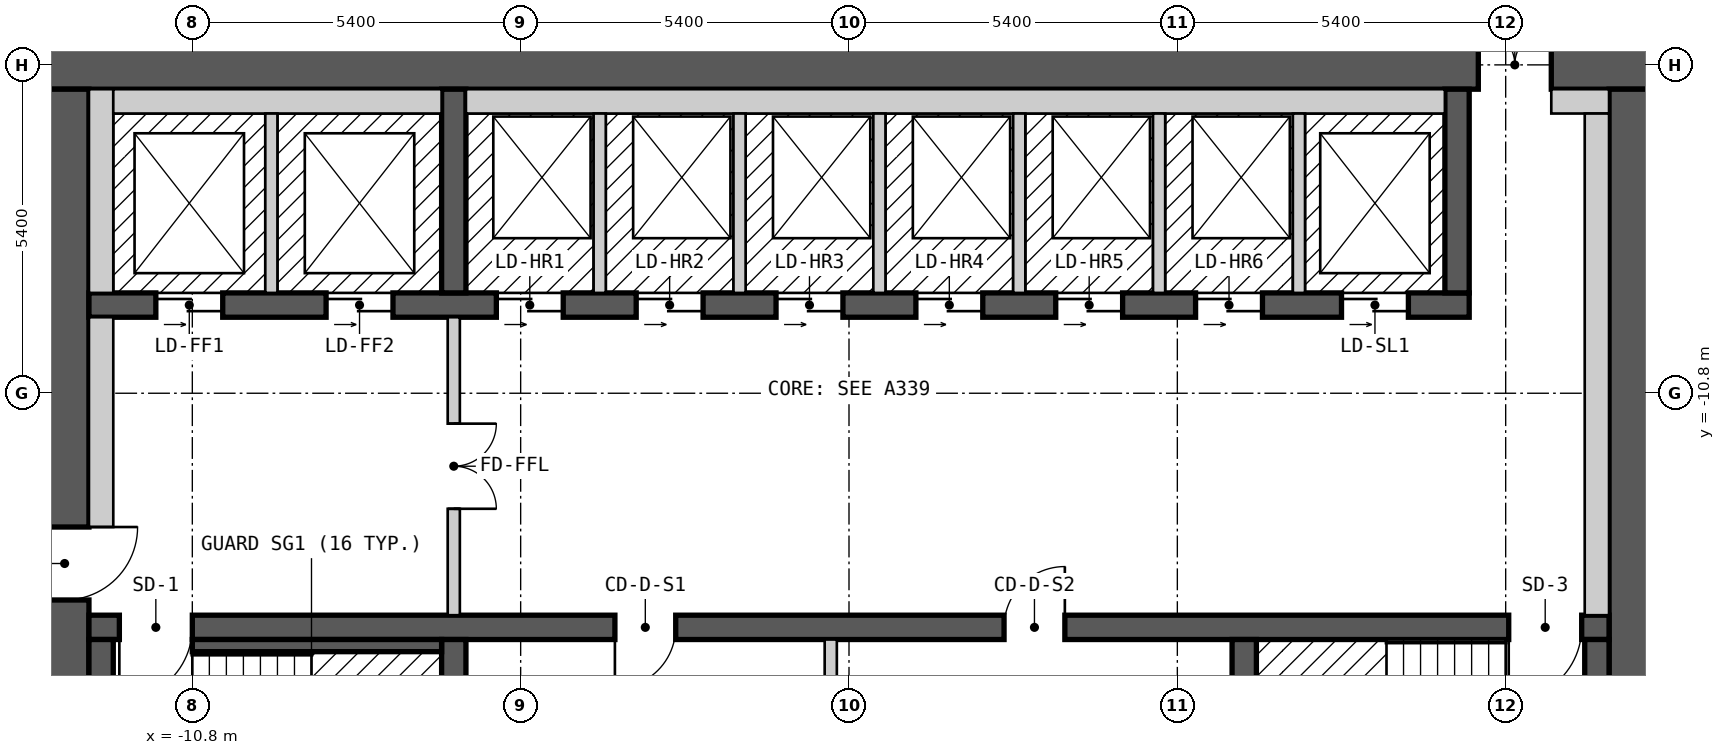
"""IFC4 building model, lengths in metres.
Left out: names, types, materials, properties, quantities, classifications, styles, units other than length and angle.
Written with IfcOpenShell. Run it as: python <this file> out.ifc"""

import sys

from ifc_helpers import new_model, si_unit, direction, frame, frame_2d, origin, place, context, subcontext, project, spatial, rectangle, extrude, element, fill, save


model = new_model("IFC4")
c1 = context("Model", 3, precision=1e-05, world=origin(), true_north=direction((0.0, 1.0)))
c2 = subcontext(c1, "Body", "Model", "MODEL_VIEW")
j1 = project(units=[si_unit("LENGTHUNIT", "METRE"), si_unit("PLANEANGLEUNIT", "RADIAN")], contexts=[c1])
p1 = place(None, origin())
s1 = spatial("IfcSite", under=j1, at=p1, CompositionType="ELEMENT")
p2 = place(p1, origin())
s2 = spatial("IfcBuilding", under=s1, at=p2, CompositionType="ELEMENT")
p3 = place(p2, frame((0.0, 0.0, 144.6)))
s3 = spatial("IfcBuildingStorey", under=s2, at=p3, CompositionType="ELEMENT", Elevation=144.6)
p4 = place(p3, frame((-13.3, -5.4, 0.0), z_axis=(0.0, 0.0, 1.0), x_axis=(1.0, 0.0, 0.0)))
e1 = element("IfcWall", 1, at=p4, inside=s3, PredefinedType="SHEAR", context=c2, shape_type="SweptSolid", body=[
    extrude(rectangle(XDim=26.6, YDim=0.8, at=frame_2d((13.3, 0.0))), origin(), (0.0, 0.0, 1.0), 2.7),
])
p5 = place(p4, frame((23.65, 0.0, 0.0)))
e2 = element("IfcOpeningElement", 2, at=p5, cuts=e1, PredefinedType="OPENING", context=c2, shape_type="SweptSolid", body=[
    extrude(rectangle(XDim=1.2, YDim=2.1, at=frame_2d((0.6, 1.05))), frame((0.0, 0.41, 0.0), z_axis=(0.0, -1.0, 0.0), x_axis=(1.0, 0.0, 0.0)), (0.0, 0.0, 1.0), 0.82),
])
p6 = place(p3, frame((-12.9, -18.2, 0.0), z_axis=(0.0, 0.0, 1.0), x_axis=(0.0, 1.0, 0.0)))
e3 = element("IfcWall", 3, at=p6, inside=s3, PredefinedType="SHEAR", context=c2, shape_type="SweptSolid", body=[
    extrude(rectangle(XDim=12.4, YDim=0.8, at=frame_2d((6.2, 0.0))), origin(), (0.0, 0.0, 1.0), 2.7),
])
p7 = place(p6, frame((4.0, 0.0, 0.0)))
e4 = element("IfcOpeningElement", 4, at=p7, cuts=e3, PredefinedType="OPENING", context=c2, shape_type="SweptSolid", body=[
    extrude(rectangle(XDim=1.2, YDim=2.1, at=frame_2d((0.6, 1.05))), frame((0.0, 0.41, 0.0), z_axis=(0.0, -1.0, 0.0), x_axis=(1.0, 0.0, 0.0)), (0.0, 0.0, 1.0), 0.82),
])
p8 = place(p3, frame((12.9, -18.2, 0.0), z_axis=(0.0, 0.0, 1.0), x_axis=(0.0, 1.0, 0.0)))
e5 = element("IfcWall", 5, at=p8, inside=s3, PredefinedType="SHEAR", context=c2, shape_type="SweptSolid", body=[
    extrude(rectangle(XDim=12.4, YDim=0.8, at=frame_2d((6.2, 0.0))), origin(), (0.0, 0.0, 1.0), 2.7),
])
p9 = place(p3, frame((-12.5, -14.65, 0.0), z_axis=(0.0, 0.0, 1.0), x_axis=(1.0, 0.0, 0.0)))
e6 = element("IfcWall", 6, at=p9, inside=s3, PredefinedType="SHEAR", context=c2, shape_type="SweptSolid", body=[
    extrude(rectangle(XDim=25.0, YDim=0.4, at=frame_2d((12.5, 0.0))), origin(), (0.0, 0.0, 1.0), 2.7),
])
p10 = place(p9, frame((1.7, 0.0, 0.0), z_axis=(0.0, 0.0, 1.0), x_axis=(-1.0, 0.0, 0.0)))
e7 = element("IfcOpeningElement", 7, at=p10, cuts=e6, PredefinedType="OPENING", context=c2, shape_type="SweptSolid", body=[
    extrude(rectangle(XDim=1.2, YDim=2.1, at=frame_2d((0.6, 1.05))), frame((0.0, 0.21, 0.0), z_axis=(0.0, -1.0, 0.0), x_axis=(1.0, 0.0, 0.0)), (0.0, 0.0, 1.0), 0.42),
])
p11 = place(p9, frame((24.55, 0.0, 0.0), z_axis=(0.0, 0.0, 1.0), x_axis=(-1.0, 0.0, 0.0)))
e8 = element("IfcOpeningElement", 8, at=p11, cuts=e6, PredefinedType="OPENING", context=c2, shape_type="SweptSolid", body=[
    extrude(rectangle(XDim=1.2, YDim=2.1, at=frame_2d((0.6, 1.05))), frame((0.0, 0.21, 0.0), z_axis=(0.0, -1.0, 0.0), x_axis=(1.0, 0.0, 0.0)), (0.0, 0.0, 1.0), 0.42),
])
p12 = place(p9, frame((9.65, 0.0, 0.0), z_axis=(0.0, 0.0, 1.0), x_axis=(-1.0, 0.0, 0.0)))
e9 = element("IfcOpeningElement", 9, at=p12, cuts=e6, PredefinedType="OPENING", context=c2, shape_type="SweptSolid", body=[
    extrude(rectangle(XDim=1.0, YDim=2.1, at=frame_2d((0.5, 1.05))), frame((0.0, 0.21, 0.0), z_axis=(0.0, -1.0, 0.0), x_axis=(1.0, 0.0, 0.0)), (0.0, 0.0, 1.0), 0.42),
])
p13 = place(p9, frame((16.05, 0.0, 0.0), z_axis=(0.0, 0.0, 1.0), x_axis=(-1.0, 0.0, 0.0)))
e10 = element("IfcOpeningElement", 10, at=p13, cuts=e6, PredefinedType="OPENING", context=c2, shape_type="SweptSolid", body=[
    extrude(rectangle(XDim=1.0, YDim=2.1, at=frame_2d((0.5, 1.05))), frame((0.0, 0.21, 0.0), z_axis=(0.0, -1.0, 0.0), x_axis=(1.0, 0.0, 0.0)), (0.0, 0.0, 1.0), 0.42),
])
p14 = place(p3, frame((-12.5, -9.35, 0.0), z_axis=(0.0, 0.0, 1.0), x_axis=(1.0, 0.0, 0.0)))
e11 = element("IfcWall", 11, at=p14, inside=s3, PredefinedType="SHEAR", context=c2, shape_type="SweptSolid", body=[
    extrude(rectangle(XDim=22.7, YDim=0.4, at=frame_2d((11.35, 0.0))), origin(), (0.0, 0.0, 1.0), 2.7),
])
p15 = place(p14, frame((1.1, 0.0, 0.0)))
e12 = element("IfcOpeningElement", 12, at=p15, cuts=e11, PredefinedType="OPENING", context=c2, shape_type="SweptSolid", body=[
    extrude(rectangle(XDim=1.1, YDim=2.1, at=frame_2d((0.55, 1.05))), frame((0.0, 0.21, 0.0), z_axis=(0.0, -1.0, 0.0), x_axis=(1.0, 0.0, 0.0)), (0.0, 0.0, 1.0), 0.42),
])
p16 = place(p14, frame((3.9, 0.0, 0.0)))
e13 = element("IfcOpeningElement", 13, at=p16, cuts=e11, PredefinedType="OPENING", context=c2, shape_type="SweptSolid", body=[
    extrude(rectangle(XDim=1.1, YDim=2.1, at=frame_2d((0.55, 1.05))), frame((0.0, 0.21, 0.0), z_axis=(0.0, -1.0, 0.0), x_axis=(1.0, 0.0, 0.0)), (0.0, 0.0, 1.0), 0.42),
])
p17 = place(p14, frame((6.7, 0.0, 0.0)))
e14 = element("IfcOpeningElement", 14, at=p17, cuts=e11, PredefinedType="OPENING", context=c2, shape_type="SweptSolid", body=[
    extrude(rectangle(XDim=1.1, YDim=2.1, at=frame_2d((0.55, 1.05))), frame((0.0, 0.21, 0.0), z_axis=(0.0, -1.0, 0.0), x_axis=(1.0, 0.0, 0.0)), (0.0, 0.0, 1.0), 0.42),
])
p18 = place(p14, frame((9.0, 0.0, 0.0)))
e15 = element("IfcOpeningElement", 15, at=p18, cuts=e11, PredefinedType="OPENING", context=c2, shape_type="SweptSolid", body=[
    extrude(rectangle(XDim=1.1, YDim=2.1, at=frame_2d((0.55, 1.05))), frame((0.0, 0.21, 0.0), z_axis=(0.0, -1.0, 0.0), x_axis=(1.0, 0.0, 0.0)), (0.0, 0.0, 1.0), 0.42),
])
p19 = place(p14, frame((11.3, 0.0, 0.0)))
e16 = element("IfcOpeningElement", 16, at=p19, cuts=e11, PredefinedType="OPENING", context=c2, shape_type="SweptSolid", body=[
    extrude(rectangle(XDim=1.1, YDim=2.1, at=frame_2d((0.55, 1.05))), frame((0.0, 0.21, 0.0), z_axis=(0.0, -1.0, 0.0), x_axis=(1.0, 0.0, 0.0)), (0.0, 0.0, 1.0), 0.42),
])
p20 = place(p14, frame((13.6, 0.0, 0.0)))
e17 = element("IfcOpeningElement", 17, at=p20, cuts=e11, PredefinedType="OPENING", context=c2, shape_type="SweptSolid", body=[
    extrude(rectangle(XDim=1.1, YDim=2.1, at=frame_2d((0.55, 1.05))), frame((0.0, 0.21, 0.0), z_axis=(0.0, -1.0, 0.0), x_axis=(1.0, 0.0, 0.0)), (0.0, 0.0, 1.0), 0.42),
])
p21 = place(p14, frame((15.9, 0.0, 0.0)))
e18 = element("IfcOpeningElement", 18, at=p21, cuts=e11, PredefinedType="OPENING", context=c2, shape_type="SweptSolid", body=[
    extrude(rectangle(XDim=1.1, YDim=2.1, at=frame_2d((0.55, 1.05))), frame((0.0, 0.21, 0.0), z_axis=(0.0, -1.0, 0.0), x_axis=(1.0, 0.0, 0.0)), (0.0, 0.0, 1.0), 0.42),
])
p22 = place(p14, frame((18.2, 0.0, 0.0)))
e19 = element("IfcOpeningElement", 19, at=p22, cuts=e11, PredefinedType="OPENING", context=c2, shape_type="SweptSolid", body=[
    extrude(rectangle(XDim=1.1, YDim=2.1, at=frame_2d((0.55, 1.05))), frame((0.0, 0.21, 0.0), z_axis=(0.0, -1.0, 0.0), x_axis=(1.0, 0.0, 0.0)), (0.0, 0.0, 1.0), 0.42),
])
p23 = place(p14, frame((20.6, 0.0, 0.0)))
e20 = element("IfcOpeningElement", 20, at=p23, cuts=e11, PredefinedType="OPENING", context=c2, shape_type="SweptSolid", body=[
    extrude(rectangle(XDim=1.1, YDim=2.1, at=frame_2d((0.55, 1.05))), frame((0.0, 0.21, 0.0), z_axis=(0.0, -1.0, 0.0), x_axis=(1.0, 0.0, 0.0)), (0.0, 0.0, 1.0), 0.42),
])
for number, where, z_axis, x_axis in (
    (21, (-6.5, -18.2, 0.0), (0.0, 0.0, 1.0), (0.0, 1.0, 0.0)),
    (22, (6.5, -18.2, 0.0), (0.0, 0.0, 1.0), (0.0, 1.0, 0.0)),
    (23, (-6.5, -9.15, 0.0), (0.0, 0.0, 1.0), (0.0, 1.0, 0.0)),
    (24, (10.0, -9.15, 0.0), (0.0, 0.0, 1.0), (0.0, 1.0, 0.0)),
):
    element("IfcWall", number, at=place(p3, frame(where, z_axis=z_axis, x_axis=x_axis)), inside=s3, PredefinedType="SHEAR", context=c2, shape_type="SweptSolid", body=[
        extrude(rectangle(XDim=3.35, YDim=0.4, at=frame_2d((1.675, 0.0))), origin(), (0.0, 0.0, 1.0), 2.7),
    ])
p24 = place(p3, frame((-12.3, -18.2, 0.0), z_axis=(0.0, 0.0, 1.0), x_axis=(0.0, 1.0, 0.0)))
e25 = element("IfcWall", 25, at=p24, inside=s3, PredefinedType="SOLIDWALL", context=c2, shape_type="SweptSolid", body=[
    extrude(rectangle(XDim=3.35, YDim=0.4, at=frame_2d((1.675, 0.0))), origin(), (0.0, 0.0, 1.0), 2.7),
])
p25 = place(p3, frame((-12.3, -13.0, 0.0), z_axis=(0.0, 0.0, 1.0), x_axis=(0.0, 1.0, 0.0)))
e26 = element("IfcWall", 26, at=p25, inside=s3, PredefinedType="PARTITIONING", context=c2, shape_type="SweptSolid", body=[
    extrude(rectangle(XDim=3.45, YDim=0.4, at=frame_2d((1.725, 0.0))), origin(), (0.0, 0.0, 1.0), 2.7),
])
p26 = place(p3, frame((-12.3, -9.15, 0.0), z_axis=(0.0, 0.0, 1.0), x_axis=(0.0, 1.0, 0.0)))
e27 = element("IfcWall", 27, at=p26, inside=s3, PredefinedType="SOLIDWALL", context=c2, shape_type="SweptSolid", body=[
    extrude(rectangle(XDim=3.35, YDim=0.4, at=frame_2d((1.675, 0.0))), origin(), (0.0, 0.0, 1.0), 2.7),
])
p27 = place(p3, frame((-12.1, -6.0, 0.0), z_axis=(0.0, 0.0, 1.0), x_axis=(1.0, 0.0, 0.0)))
e28 = element("IfcWall", 28, at=p27, inside=s3, PredefinedType="SOLIDWALL", context=c2, shape_type="SweptSolid", body=[
    extrude(rectangle(XDim=5.4, YDim=0.4, at=frame_2d((2.7, 0.0))), origin(), (0.0, 0.0, 1.0), 2.7),
])
p28 = place(p3, frame((-10.8, -14.95, 0.0), z_axis=(0.0, 0.0, 1.0), x_axis=(1.0, 0.0, 0.0)))
e29 = element("IfcWall", 29, at=p28, inside=s3, PredefinedType="SOLIDWALL", context=c2, shape_type="SweptSolid", body=[
    extrude(rectangle(XDim=4.1, YDim=0.2, at=frame_2d((2.05, 0.0))), origin(), (0.0, 0.0, 1.0), 2.7),
])
p29 = place(p3, frame((-9.5, -9.15, 0.0), z_axis=(0.0, 0.0, 1.0), x_axis=(0.0, 1.0, 0.0)))
e30 = element("IfcWall", 30, at=p29, inside=s3, PredefinedType="SOLIDWALL", context=c2, shape_type="SweptSolid", body=[
    extrude(rectangle(XDim=2.95, YDim=0.2, at=frame_2d((1.475, 0.0))), origin(), (0.0, 0.0, 1.0), 2.7),
])
p30 = place(p3, frame((-6.5, -14.45, 0.0), z_axis=(0.0, 0.0, 1.0), x_axis=(0.0, 1.0, 0.0)))
e31 = element("IfcWall", 31, at=p30, inside=s3, PredefinedType="PARTITIONING", context=c2, shape_type="SweptSolid", body=[
    extrude(rectangle(XDim=4.9, YDim=0.2, at=frame_2d((2.45, 0.0))), origin(), (0.0, 0.0, 1.0), 2.7),
])
p31 = place(p30, frame((3.15, 0.0, 0.0), z_axis=(0.0, 0.0, 1.0), x_axis=(-1.0, 0.0, 0.0)))
e32 = element("IfcOpeningElement", 32, at=p31, cuts=e31, PredefinedType="OPENING", context=c2, shape_type="SweptSolid", body=[
    extrude(rectangle(XDim=1.4, YDim=2.1, at=frame_2d((0.7, 1.05))), frame((0.0, 0.11, 0.0), z_axis=(0.0, -1.0, 0.0), x_axis=(1.0, 0.0, 0.0)), (0.0, 0.0, 1.0), 0.22),
])
p32 = place(p3, frame((-6.3, -6.0, 0.0), z_axis=(0.0, 0.0, 1.0), x_axis=(1.0, 0.0, 0.0)))
e33 = element("IfcWall", 33, at=p32, inside=s3, PredefinedType="SOLIDWALL", context=c2, shape_type="SweptSolid", body=[
    extrude(rectangle(XDim=16.1, YDim=0.4, at=frame_2d((8.05, 0.0))), origin(), (0.0, 0.0, 1.0), 2.7),
])
for number, where, z_axis, x_axis in (
    (34, (-4.1, -9.15, 0.0), (0.0, 0.0, 1.0), (0.0, 1.0, 0.0)),
    (35, (-1.8, -9.15, 0.0), (0.0, 0.0, 1.0), (0.0, 1.0, 0.0)),
):
    element("IfcWall", number, at=place(p3, frame(where, z_axis=z_axis, x_axis=x_axis)), inside=s3, PredefinedType="SOLIDWALL", context=c2, shape_type="SweptSolid", body=[
        extrude(rectangle(XDim=2.95, YDim=0.2, at=frame_2d((1.475, 0.0))), origin(), (0.0, 0.0, 1.0), 2.7),
    ])
p33 = place(p3, frame((-0.3, -17.8, 0.0), z_axis=(0.0, 0.0, 1.0), x_axis=(0.0, 1.0, 0.0)))
e36 = element("IfcWall", 36, at=p33, inside=s3, PredefinedType="PARTITIONING", context=c2, shape_type="SweptSolid", body=[
    extrude(rectangle(XDim=2.95, YDim=0.2, at=frame_2d((1.475, 0.0))), origin(), (0.0, 0.0, 1.0), 2.7),
])
for number, where, z_axis, x_axis in (
    (37, (0.5, -9.15, 0.0), (0.0, 0.0, 1.0), (0.0, 1.0, 0.0)),
    (38, (2.8, -9.15, 0.0), (0.0, 0.0, 1.0), (0.0, 1.0, 0.0)),
    (39, (5.1, -9.15, 0.0), (0.0, 0.0, 1.0), (0.0, 1.0, 0.0)),
    (40, (7.4, -9.15, 0.0), (0.0, 0.0, 1.0), (0.0, 1.0, 0.0)),
):
    element("IfcWall", number, at=place(p3, frame(where, z_axis=z_axis, x_axis=x_axis)), inside=s3, PredefinedType="SOLIDWALL", context=c2, shape_type="SweptSolid", body=[
        extrude(rectangle(XDim=2.95, YDim=0.2, at=frame_2d((1.475, 0.0))), origin(), (0.0, 0.0, 1.0), 2.7),
    ])
p34 = place(p3, frame((11.55, -6.0, 0.0), z_axis=(0.0, 0.0, 1.0), x_axis=(1.0, 0.0, 0.0)))
e41 = element("IfcWall", 41, at=p34, inside=s3, PredefinedType="PARTITIONING", context=c2, shape_type="SweptSolid", body=[
    extrude(rectangle(XDim=0.95, YDim=0.4, at=frame_2d((0.475, 0.0))), origin(), (0.0, 0.0, 1.0), 2.7),
])
p35 = place(p3, frame((12.3, -17.6, 0.0), z_axis=(0.0, 0.0, 1.0), x_axis=(0.0, 1.0, 0.0)))
e42 = element("IfcWall", 42, at=p35, inside=s3, PredefinedType="SOLIDWALL", context=c2, shape_type="SweptSolid", body=[
    extrude(rectangle(XDim=2.75, YDim=0.4, at=frame_2d((1.375, 0.0))), origin(), (0.0, 0.0, 1.0), 2.7),
])
p36 = place(p3, frame((12.3, -14.45, 0.0), z_axis=(0.0, 0.0, 1.0), x_axis=(0.0, 1.0, 0.0)))
e43 = element("IfcWall", 43, at=p36, inside=s3, PredefinedType="PARTITIONING", context=c2, shape_type="SweptSolid", body=[
    extrude(rectangle(XDim=8.25, YDim=0.4, at=frame_2d((4.125, 0.0))), origin(), (0.0, 0.0, 1.0), 2.7),
])
p37 = place(p15, origin())
e44 = element("IfcDoor", 44, at=p37, inside=s3, OperationType="DOUBLE_DOOR_SLIDING", PredefinedType="DOOR", context=c2, shape_type="SweptSolid", body=[
    extrude(rectangle(XDim=1.1, YDim=2.1, at=frame_2d((0.55, 1.05))), frame((0.0, 0.025, 0.0), z_axis=(0.0, -1.0, 0.0), x_axis=(1.0, 0.0, 0.0)), (0.0, 0.0, 1.0), 0.05),
])
fill(e12, e44)
p38 = place(p16, origin())
e45 = element("IfcDoor", 45, at=p38, inside=s3, OperationType="DOUBLE_DOOR_SLIDING", PredefinedType="DOOR", context=c2, shape_type="SweptSolid", body=[
    extrude(rectangle(XDim=1.1, YDim=2.1, at=frame_2d((0.55, 1.05))), frame((0.0, 0.025, 0.0), z_axis=(0.0, -1.0, 0.0), x_axis=(1.0, 0.0, 0.0)), (0.0, 0.0, 1.0), 0.05),
])
fill(e13, e45)
p39 = place(p17, origin())
e46 = element("IfcDoor", 46, at=p39, inside=s3, OperationType="DOUBLE_DOOR_SLIDING", PredefinedType="DOOR", context=c2, shape_type="SweptSolid", body=[
    extrude(rectangle(XDim=1.1, YDim=2.1, at=frame_2d((0.55, 1.05))), frame((0.0, 0.025, 0.0), z_axis=(0.0, -1.0, 0.0), x_axis=(1.0, 0.0, 0.0)), (0.0, 0.0, 1.0), 0.05),
])
fill(e14, e46)
p40 = place(p18, origin())
e47 = element("IfcDoor", 47, at=p40, inside=s3, OperationType="DOUBLE_DOOR_SLIDING", PredefinedType="DOOR", context=c2, shape_type="SweptSolid", body=[
    extrude(rectangle(XDim=1.1, YDim=2.1, at=frame_2d((0.55, 1.05))), frame((0.0, 0.025, 0.0), z_axis=(0.0, -1.0, 0.0), x_axis=(1.0, 0.0, 0.0)), (0.0, 0.0, 1.0), 0.05),
])
fill(e15, e47)
p41 = place(p19, origin())
e48 = element("IfcDoor", 48, at=p41, inside=s3, OperationType="DOUBLE_DOOR_SLIDING", PredefinedType="DOOR", context=c2, shape_type="SweptSolid", body=[
    extrude(rectangle(XDim=1.1, YDim=2.1, at=frame_2d((0.55, 1.05))), frame((0.0, 0.025, 0.0), z_axis=(0.0, -1.0, 0.0), x_axis=(1.0, 0.0, 0.0)), (0.0, 0.0, 1.0), 0.05),
])
fill(e16, e48)
p42 = place(p20, origin())
e49 = element("IfcDoor", 49, at=p42, inside=s3, OperationType="DOUBLE_DOOR_SLIDING", PredefinedType="DOOR", context=c2, shape_type="SweptSolid", body=[
    extrude(rectangle(XDim=1.1, YDim=2.1, at=frame_2d((0.55, 1.05))), frame((0.0, 0.025, 0.0), z_axis=(0.0, -1.0, 0.0), x_axis=(1.0, 0.0, 0.0)), (0.0, 0.0, 1.0), 0.05),
])
fill(e17, e49)
p43 = place(p21, origin())
e50 = element("IfcDoor", 50, at=p43, inside=s3, OperationType="DOUBLE_DOOR_SLIDING", PredefinedType="DOOR", context=c2, shape_type="SweptSolid", body=[
    extrude(rectangle(XDim=1.1, YDim=2.1, at=frame_2d((0.55, 1.05))), frame((0.0, 0.025, 0.0), z_axis=(0.0, -1.0, 0.0), x_axis=(1.0, 0.0, 0.0)), (0.0, 0.0, 1.0), 0.05),
])
fill(e18, e50)
p44 = place(p22, origin())
e51 = element("IfcDoor", 51, at=p44, inside=s3, OperationType="DOUBLE_DOOR_SLIDING", PredefinedType="DOOR", context=c2, shape_type="SweptSolid", body=[
    extrude(rectangle(XDim=1.1, YDim=2.1, at=frame_2d((0.55, 1.05))), frame((0.0, 0.025, 0.0), z_axis=(0.0, -1.0, 0.0), x_axis=(1.0, 0.0, 0.0)), (0.0, 0.0, 1.0), 0.05),
])
fill(e19, e51)
p45 = place(p23, origin())
e52 = element("IfcDoor", 52, at=p45, inside=s3, OperationType="DOUBLE_DOOR_SLIDING", PredefinedType="DOOR", context=c2, shape_type="SweptSolid", body=[
    extrude(rectangle(XDim=1.1, YDim=2.1, at=frame_2d((0.55, 1.05))), frame((0.0, 0.025, 0.0), z_axis=(0.0, -1.0, 0.0), x_axis=(1.0, 0.0, 0.0)), (0.0, 0.0, 1.0), 0.05),
])
fill(e20, e52)
p46 = place(p10, origin())
e53 = element("IfcDoor", 53, at=p46, inside=s3, OperationType="SINGLE_SWING_RIGHT", PredefinedType="DOOR", context=c2, shape_type="SweptSolid", body=[
    extrude(rectangle(XDim=1.2, YDim=2.1, at=frame_2d((0.6, 1.05))), frame((0.0, 0.025, 0.0), z_axis=(0.0, -1.0, 0.0), x_axis=(1.0, 0.0, 0.0)), (0.0, 0.0, 1.0), 0.05),
])
fill(e7, e53)
p47 = place(p11, origin())
e54 = element("IfcDoor", 54, at=p47, inside=s3, OperationType="SINGLE_SWING_RIGHT", PredefinedType="DOOR", context=c2, shape_type="SweptSolid", body=[
    extrude(rectangle(XDim=1.2, YDim=2.1, at=frame_2d((0.6, 1.05))), frame((0.0, 0.025, 0.0), z_axis=(0.0, -1.0, 0.0), x_axis=(1.0, 0.0, 0.0)), (0.0, 0.0, 1.0), 0.05),
])
fill(e8, e54)
p48 = place(p7, origin())
e55 = element("IfcDoor", 55, at=p48, inside=s3, OperationType="SINGLE_SWING_RIGHT", PredefinedType="DOOR", context=c2, shape_type="SweptSolid", body=[
    extrude(rectangle(XDim=1.2, YDim=2.1, at=frame_2d((0.6, 1.05))), frame((0.0, 0.025, 0.0), z_axis=(0.0, -1.0, 0.0), x_axis=(1.0, 0.0, 0.0)), (0.0, 0.0, 1.0), 0.05),
])
fill(e4, e55)
p49 = place(p31, origin())
e56 = element("IfcDoor", 56, at=p49, inside=s3, OperationType="DOUBLE_DOOR_SINGLE_SWING", PredefinedType="DOOR", context=c2, shape_type="SweptSolid", body=[
    extrude(rectangle(XDim=1.4, YDim=2.1, at=frame_2d((0.7, 1.05))), frame((0.0, 0.025, 0.0), z_axis=(0.0, -1.0, 0.0), x_axis=(1.0, 0.0, 0.0)), (0.0, 0.0, 1.0), 0.05),
])
fill(e32, e56)
p50 = place(p5, origin())
e57 = element("IfcDoor", 57, at=p50, inside=s3, OperationType="DOUBLE_DOOR_SINGLE_SWING", PredefinedType="DOOR", context=c2, shape_type="SweptSolid", body=[
    extrude(rectangle(XDim=1.2, YDim=2.1, at=frame_2d((0.6, 1.05))), frame((0.0, 0.025, 0.0), z_axis=(0.0, -1.0, 0.0), x_axis=(1.0, 0.0, 0.0)), (0.0, 0.0, 1.0), 0.05),
])
fill(e2, e57)
p51 = place(p12, origin())
e58 = element("IfcDoor", 58, at=p51, inside=s3, OperationType="SINGLE_SWING_RIGHT", PredefinedType="DOOR", context=c2, shape_type="SweptSolid", body=[
    extrude(rectangle(XDim=1.0, YDim=2.1, at=frame_2d((0.5, 1.05))), frame((0.0, 0.025, 0.0), z_axis=(0.0, -1.0, 0.0), x_axis=(1.0, 0.0, 0.0)), (0.0, 0.0, 1.0), 0.05),
])
fill(e9, e58)
p52 = place(p13, origin())
e59 = element("IfcDoor", 59, at=p52, inside=s3, OperationType="SINGLE_SWING_LEFT", PredefinedType="DOOR", context=c2, shape_type="SweptSolid", body=[
    extrude(rectangle(XDim=1.0, YDim=2.1, at=frame_2d((0.5, 1.05))), frame((0.0, 0.025, 0.0), z_axis=(0.0, -1.0, 0.0), x_axis=(1.0, 0.0, 0.0)), (0.0, 0.0, 1.0), 0.05),
])
fill(e10, e59)
save(model, sys.argv[1])
